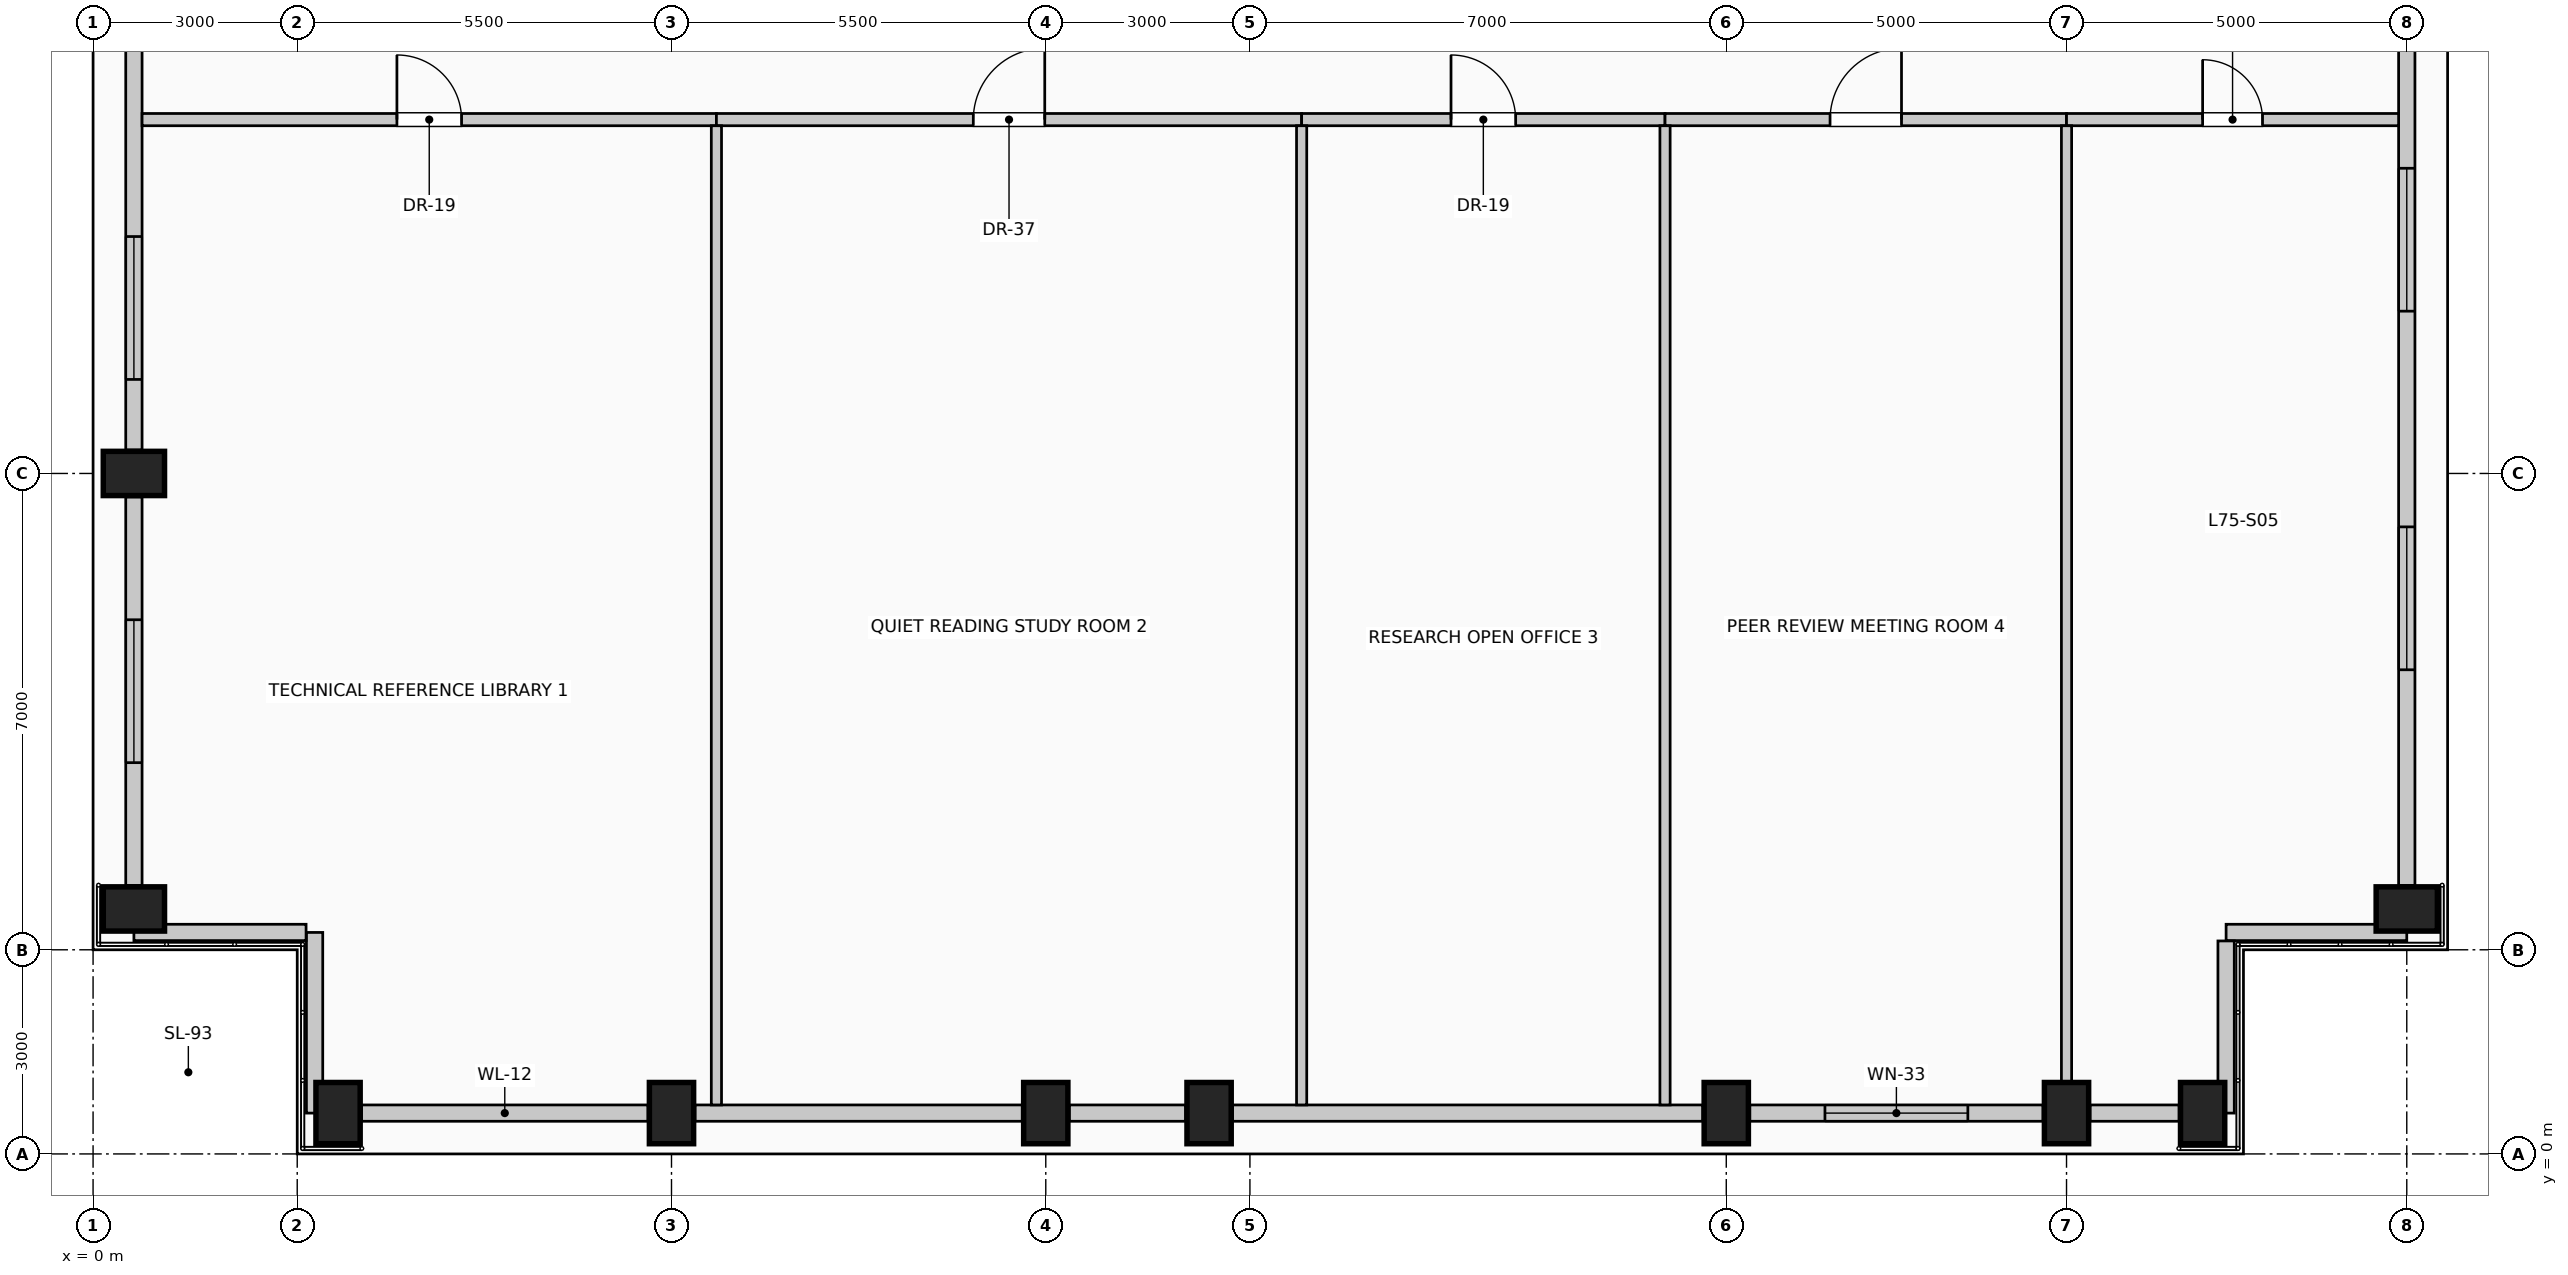
"""IFC4 building model, lengths in metres.
Left out: names, types, materials, properties, quantities, classifications, styles, units other than length and angle.
Written with IfcOpenShell. Run it as: python <this file> out.ifc"""

import sys

from ifc_helpers import new_model, si_unit, direction, frame, frame_2d, origin, origin_2d, place, context, subcontext, project, spatial, rectangle, extrude, element, fill, save


model = new_model("IFC4")
c1 = context("Model", 3, precision=1e-05, world=origin(), true_north=direction((0.0, 1.0)))
c2 = subcontext(c1, "Body", "Model", "MODEL_VIEW")
j1 = project(units=[si_unit("LENGTHUNIT", "METRE"), si_unit("PLANEANGLEUNIT", "RADIAN")], contexts=[c1])
p1 = place(None, origin())
s1 = spatial("IfcSite", under=j1, at=p1, CompositionType="ELEMENT")
p2 = place(p1, origin())
s2 = spatial("IfcBuilding", under=s1, at=p2, CompositionType="ELEMENT")
p3 = place(p2, frame((0.0, 0.0, 309.0)))
s3 = spatial("IfcBuildingStorey", under=s2, at=p3, CompositionType="ELEMENT", Elevation=309.0)
for number, where, z_axis, x_axis in (
    (1, (3.6, 0.6, 0.0), (0.0, 0.0, 1.0), (1.0, 0.0, 0.0)),
    (2, (8.5, 0.6, 0.0), (0.0, 0.0, 1.0), (1.0, 0.0, 0.0)),
    (3, (14.0, 0.6, 0.0), (0.0, 0.0, 1.0), (1.0, 0.0, 0.0)),
    (4, (16.4, 0.6, 0.0), (0.0, 0.0, 1.0), (1.0, 0.0, 0.0)),
    (5, (24.0, 0.6, 0.0), (0.0, 0.0, 1.0), (1.0, 0.0, 0.0)),
    (6, (29.0, 0.6, 0.0), (0.0, 0.0, 1.0), (1.0, 0.0, 0.0)),
    (7, (31.0, 0.6, 0.0), (0.0, 0.0, 1.0), (1.0, 0.0, 0.0)),
    (8, (0.6, 3.6, 0.0), (0.0, 0.0, 1.0), (0.0, 1.0, 0.0)),
    (9, (34.0, 3.6, 0.0), (0.0, 0.0, 1.0), (0.0, 1.0, 0.0)),
    (10, (0.6, 10.0, 0.0), (0.0, 0.0, 1.0), (0.0, 1.0, 0.0)),
):
    element("IfcColumn", number, at=place(p3, frame(where, z_axis=z_axis, x_axis=x_axis)), inside=s3, PredefinedType="COLUMN", context=c2, shape_type="SweptSolid", body=[
        extrude(rectangle(XDim=0.65, YDim=0.9, at=origin_2d()), origin(), (0.0, 0.0, 1.0), 4.0),
    ])
p4 = place(p3, frame((8.155, 0.6, 0.0), z_axis=(0.0, 0.0, 1.0), x_axis=(-1.0, 0.0, 0.0)))
e11 = element("IfcWall", 11, at=p4, inside=s3, PredefinedType="SOLIDWALL", context=c2, shape_type="SweptSolid", body=[
    extrude(rectangle(XDim=4.21, YDim=0.24, at=frame_2d((2.105, 0.0))), origin(), (0.0, 0.0, 1.0), 3.025),
])
p5 = place(p3, frame((13.655, 0.6, 0.0), z_axis=(0.0, 0.0, 1.0), x_axis=(-1.0, 0.0, 0.0)))
e12 = element("IfcWall", 12, at=p5, inside=s3, PredefinedType="SOLIDWALL", context=c2, shape_type="SweptSolid", body=[
    extrude(rectangle(XDim=4.81, YDim=0.24, at=frame_2d((2.405, 0.0))), origin(), (0.0, 0.0, 1.0), 3.025),
])
p6 = place(p3, frame((16.055, 0.6, 0.0), z_axis=(0.0, 0.0, 1.0), x_axis=(-1.0, 0.0, 0.0)))
e13 = element("IfcWall", 13, at=p6, inside=s3, PredefinedType="SOLIDWALL", context=c2, shape_type="SweptSolid", body=[
    extrude(rectangle(XDim=1.71, YDim=0.24, at=frame_2d((0.855, 0.0))), origin(), (0.0, 0.0, 1.0), 3.025),
])
p7 = place(p3, frame((23.655, 0.6, 0.0), z_axis=(0.0, 0.0, 1.0), x_axis=(-1.0, 0.0, 0.0)))
e14 = element("IfcWall", 14, at=p7, inside=s3, PredefinedType="SOLIDWALL", context=c2, shape_type="SweptSolid", body=[
    extrude(rectangle(XDim=6.91, YDim=0.24, at=frame_2d((3.455, 0.0))), origin(), (0.0, 0.0, 1.0), 3.025),
])
p8 = place(p3, frame((28.655, 0.6, 0.0), z_axis=(0.0, 0.0, 1.0), x_axis=(-1.0, 0.0, 0.0)))
e15 = element("IfcWall", 15, at=p8, inside=s3, PredefinedType="SOLIDWALL", context=c2, shape_type="SweptSolid", body=[
    extrude(rectangle(XDim=4.31, YDim=0.24, at=frame_2d((2.155, 0.0))), origin(), (0.0, 0.0, 1.0), 3.025),
])
p9 = place(p8, frame((1.105, 0.0, 0.35)))
e16 = element("IfcOpeningElement", 16, at=p9, cuts=e15, PredefinedType="OPENING", context=c2, shape_type="SweptSolid", body=[
    extrude(rectangle(XDim=2.1, YDim=2.2, at=frame_2d((1.05, 1.1))), frame((0.0, 0.13, 0.0), z_axis=(0.0, -1.0, 0.0), x_axis=(1.0, 0.0, 0.0)), (0.0, 0.0, 1.0), 0.26),
])
p10 = place(p3, frame((30.655, 0.6, 0.0), z_axis=(0.0, 0.0, 1.0), x_axis=(-1.0, 0.0, 0.0)))
e17 = element("IfcWall", 17, at=p10, inside=s3, PredefinedType="SOLIDWALL", context=c2, shape_type="SweptSolid", body=[
    extrude(rectangle(XDim=1.31, YDim=0.24, at=frame_2d((0.655, 0.0))), origin(), (0.0, 0.0, 1.0), 3.025),
])
p11 = place(p3, frame((0.6, 3.945, 0.0), z_axis=(0.0, 0.0, 1.0), x_axis=(0.0, 1.0, 0.0)))
e18 = element("IfcWall", 18, at=p11, inside=s3, PredefinedType="SOLIDWALL", context=c2, shape_type="SweptSolid", body=[
    extrude(rectangle(XDim=5.71, YDim=0.24, at=frame_2d((2.855, 0.0))), origin(), (0.0, 0.0, 1.0), 3.025),
])
p12 = place(p11, frame((1.805, 0.0, 0.35)))
e19 = element("IfcOpeningElement", 19, at=p12, cuts=e18, PredefinedType="OPENING", context=c2, shape_type="SweptSolid", body=[
    extrude(rectangle(XDim=2.1, YDim=2.2, at=frame_2d((1.05, 1.1))), frame((0.0, 0.13, 0.0), z_axis=(0.0, -1.0, 0.0), x_axis=(1.0, 0.0, 0.0)), (0.0, 0.0, 1.0), 0.26),
])
p13 = place(p3, frame((0.6, 10.345, 0.0), z_axis=(0.0, 0.0, 1.0), x_axis=(0.0, 1.0, 0.0)))
e20 = element("IfcWall", 20, at=p13, inside=s3, PredefinedType="SOLIDWALL", context=c2, shape_type="SweptSolid", body=[
    extrude(rectangle(XDim=7.31, YDim=0.24, at=frame_2d((3.655, 0.0))), origin(), (0.0, 0.0, 1.0), 3.025),
])
p14 = place(p13, frame((1.037, 0.0, 0.35)))
e21 = element("IfcOpeningElement", 21, at=p14, cuts=e20, PredefinedType="OPENING", context=c2, shape_type="SweptSolid", body=[
    extrude(rectangle(XDim=2.1, YDim=2.2, at=frame_2d((1.05, 1.1))), frame((0.0, 0.13, 0.0), z_axis=(0.0, -1.0, 0.0), x_axis=(1.0, 0.0, 0.0)), (0.0, 0.0, 1.0), 0.26),
])
p15 = place(p3, frame((34.0, 17.655, 0.0), z_axis=(0.0, 0.0, 1.0), x_axis=(0.0, -1.0, 0.0)))
e22 = element("IfcWall", 22, at=p15, inside=s3, PredefinedType="SOLIDWALL", context=c2, shape_type="SweptSolid", body=[
    extrude(rectangle(XDim=13.71, YDim=0.24, at=frame_2d((6.855, 0.0))), origin(), (0.0, 0.0, 1.0), 3.025),
])
p16 = place(p15, frame((3.17, 0.0, 0.35)))
e23 = element("IfcOpeningElement", 23, at=p16, cuts=e22, PredefinedType="OPENING", context=c2, shape_type="SweptSolid", body=[
    extrude(rectangle(XDim=2.1, YDim=2.2, at=frame_2d((1.05, 1.1))), frame((0.0, 0.13, 0.0), z_axis=(0.0, -1.0, 0.0), x_axis=(1.0, 0.0, 0.0)), (0.0, 0.0, 1.0), 0.26),
])
p17 = place(p15, frame((8.44, 0.0, 0.35)))
e24 = element("IfcOpeningElement", 24, at=p17, cuts=e22, PredefinedType="OPENING", context=c2, shape_type="SweptSolid", body=[
    extrude(rectangle(XDim=2.1, YDim=2.2, at=frame_2d((1.05, 1.1))), frame((0.0, 0.13, 0.0), z_axis=(0.0, -1.0, 0.0), x_axis=(1.0, 0.0, 0.0)), (0.0, 0.0, 1.0), 0.26),
])
p18 = place(p3, frame((34.0, 3.255, 0.0), z_axis=(0.0, 0.0, 1.0), x_axis=(-1.0, 0.0, 0.0)))
e25 = element("IfcWall", 25, at=p18, inside=s3, PredefinedType="SOLIDWALL", context=c2, shape_type="SweptSolid", body=[
    extrude(rectangle(XDim=2.655, YDim=0.24, at=frame_2d((1.328, 0.0))), origin(), (0.0, 0.0, 1.0), 3.775),
])
p19 = place(p3, frame((31.345, 3.13, 0.0), z_axis=(0.0, 0.0, 1.0), x_axis=(0.0, -1.0, 0.0)))
e26 = element("IfcWall", 26, at=p19, inside=s3, PredefinedType="SOLIDWALL", context=c2, shape_type="SweptSolid", body=[
    extrude(rectangle(XDim=2.53, YDim=0.24, at=frame_2d((1.265, 0.0))), origin(), (0.0, 0.0, 1.0), 3.775),
])
p20 = place(p3, frame((3.255, 0.6, 0.0), z_axis=(0.0, 0.0, 1.0), x_axis=(0.0, 1.0, 0.0)))
e27 = element("IfcWall", 27, at=p20, inside=s3, PredefinedType="SOLIDWALL", context=c2, shape_type="SweptSolid", body=[
    extrude(rectangle(XDim=2.655, YDim=0.24, at=frame_2d((1.327, 0.0))), origin(), (0.0, 0.0, 1.0), 3.775),
])
p21 = place(p3, frame((3.13, 3.255, 0.0), z_axis=(0.0, 0.0, 1.0), x_axis=(-1.0, 0.0, 0.0)))
e28 = element("IfcWall", 28, at=p21, inside=s3, PredefinedType="SOLIDWALL", context=c2, shape_type="SweptSolid", body=[
    extrude(rectangle(XDim=2.53, YDim=0.24, at=frame_2d((1.265, 0.0))), origin(), (0.0, 0.0, 1.0), 3.775),
])
p22 = place(p3, frame((0.72, 15.2, 0.0), z_axis=(0.0, 0.0, 1.0), x_axis=(1.0, 0.0, 0.0)))
e29 = element("IfcWall", 29, at=p22, inside=s3, PredefinedType="PARTITIONING", context=c2, shape_type="SweptSolid", body=[
    extrude(rectangle(XDim=8.44, YDim=0.18, at=frame_2d((4.22, 0.0))), origin(), (0.0, 0.0, 1.0), 3.775),
])
p23 = place(p22, frame((3.745, 0.0, 0.0)))
e30 = element("IfcOpeningElement", 30, at=p23, cuts=e29, PredefinedType="OPENING", context=c2, shape_type="SweptSolid", body=[
    extrude(rectangle(XDim=0.95, YDim=2.15, at=frame_2d((0.475, 1.075))), frame((0.0, 0.1, 0.0), z_axis=(0.0, -1.0, 0.0), x_axis=(1.0, 0.0, 0.0)), (0.0, 0.0, 1.0), 0.2),
])
p24 = place(p3, frame((9.16, 15.2, 0.0), z_axis=(0.0, 0.0, 1.0), x_axis=(1.0, 0.0, 0.0)))
e31 = element("IfcWall", 31, at=p24, inside=s3, PredefinedType="PARTITIONING", context=c2, shape_type="SweptSolid", body=[
    extrude(rectangle(XDim=8.6, YDim=0.18, at=frame_2d((4.3, 0.0))), origin(), (0.0, 0.0, 1.0), 3.775),
])
p25 = place(p24, frame((3.775, 0.0, 0.0)))
e32 = element("IfcOpeningElement", 32, at=p25, cuts=e31, PredefinedType="OPENING", context=c2, shape_type="SweptSolid", body=[
    extrude(rectangle(XDim=1.05, YDim=2.15, at=frame_2d((0.525, 1.075))), frame((0.0, 0.1, 0.0), z_axis=(0.0, -1.0, 0.0), x_axis=(1.0, 0.0, 0.0)), (0.0, 0.0, 1.0), 0.2),
])
p26 = place(p3, frame((17.76, 15.2, 0.0), z_axis=(0.0, 0.0, 1.0), x_axis=(1.0, 0.0, 0.0)))
e33 = element("IfcWall", 33, at=p26, inside=s3, PredefinedType="PARTITIONING", context=c2, shape_type="SweptSolid", body=[
    extrude(rectangle(XDim=5.34, YDim=0.18, at=frame_2d((2.67, 0.0))), origin(), (0.0, 0.0, 1.0), 3.775),
])
p27 = place(p26, frame((2.195, 0.0, 0.0)))
e34 = element("IfcOpeningElement", 34, at=p27, cuts=e33, PredefinedType="OPENING", context=c2, shape_type="SweptSolid", body=[
    extrude(rectangle(XDim=0.95, YDim=2.15, at=frame_2d((0.475, 1.075))), frame((0.0, 0.1, 0.0), z_axis=(0.0, -1.0, 0.0), x_axis=(1.0, 0.0, 0.0)), (0.0, 0.0, 1.0), 0.2),
])
p28 = place(p3, frame((23.1, 15.2, 0.0), z_axis=(0.0, 0.0, 1.0), x_axis=(1.0, 0.0, 0.0)))
e35 = element("IfcWall", 35, at=p28, inside=s3, PredefinedType="PARTITIONING", context=c2, shape_type="SweptSolid", body=[
    extrude(rectangle(XDim=5.9, YDim=0.18, at=frame_2d((2.95, 0.0))), origin(), (0.0, 0.0, 1.0), 3.775),
])
p29 = place(p28, frame((2.425, 0.0, 0.0)))
e36 = element("IfcOpeningElement", 36, at=p29, cuts=e35, PredefinedType="OPENING", context=c2, shape_type="SweptSolid", body=[
    extrude(rectangle(XDim=1.05, YDim=2.15, at=frame_2d((0.525, 1.075))), frame((0.0, 0.1, 0.0), z_axis=(0.0, -1.0, 0.0), x_axis=(1.0, 0.0, 0.0)), (0.0, 0.0, 1.0), 0.2),
])
p30 = place(p3, frame((29.0, 15.2, 0.0), z_axis=(0.0, 0.0, 1.0), x_axis=(1.0, 0.0, 0.0)))
e37 = element("IfcWall", 37, at=p30, inside=s3, PredefinedType="PARTITIONING", context=c2, shape_type="SweptSolid", body=[
    extrude(rectangle(XDim=4.88, YDim=0.18, at=frame_2d((2.44, 0.0))), origin(), (0.0, 0.0, 1.0), 3.775),
])
p31 = place(p30, frame((2.0, 0.0, 0.0)))
e38 = element("IfcOpeningElement", 38, at=p31, cuts=e37, PredefinedType="OPENING", context=c2, shape_type="SweptSolid", body=[
    extrude(rectangle(XDim=0.88, YDim=2.1, at=frame_2d((0.44, 1.05))), frame((0.0, 0.1, 0.0), z_axis=(0.0, -1.0, 0.0), x_axis=(1.0, 0.0, 0.0)), (0.0, 0.0, 1.0), 0.2),
])
for number, where, z_axis, x_axis in (
    (39, (9.16, 0.72, 0.0), (0.0, 0.0, 1.0), (0.0, 1.0, 0.0)),
    (40, (17.76, 0.72, 0.0), (0.0, 0.0, 1.0), (0.0, 1.0, 0.0)),
    (41, (23.1, 0.72, 0.0), (0.0, 0.0, 1.0), (0.0, 1.0, 0.0)),
):
    element("IfcWall", number, at=place(p3, frame(where, z_axis=z_axis, x_axis=x_axis)), inside=s3, PredefinedType="PARTITIONING", context=c2, shape_type="SweptSolid", body=[
        extrude(rectangle(XDim=14.39, YDim=0.15, at=frame_2d((7.195, 0.0))), origin(), (0.0, 0.0, 1.0), 3.775),
    ])
p32 = place(p3, frame((29.0, 1.05, 0.0), z_axis=(0.0, 0.0, 1.0), x_axis=(0.0, 1.0, 0.0)))
e42 = element("IfcWall", 42, at=p32, inside=s3, PredefinedType="PARTITIONING", context=c2, shape_type="SweptSolid", body=[
    extrude(rectangle(XDim=14.06, YDim=0.15, at=frame_2d((7.03, 0.0))), origin(), (0.0, 0.0, 1.0), 3.27),
])
p33 = place(p9, origin())
e43 = element("IfcWindow", 43, at=p33, inside=s3, PartitioningType="SINGLE_PANEL", PredefinedType="WINDOW", context=c2, shape_type="SweptSolid", body=[
    extrude(rectangle(XDim=2.1, YDim=2.2, at=frame_2d((1.05, 1.1))), frame((0.0, 0.03, 0.0), z_axis=(0.0, -1.0, 0.0), x_axis=(1.0, 0.0, 0.0)), (0.0, 0.0, 1.0), 0.06),
])
fill(e16, e43)
p34 = place(p12, origin())
e44 = element("IfcWindow", 44, at=p34, inside=s3, PartitioningType="SINGLE_PANEL", PredefinedType="WINDOW", context=c2, shape_type="SweptSolid", body=[
    extrude(rectangle(XDim=2.1, YDim=2.2, at=frame_2d((1.05, 1.1))), frame((0.0, 0.03, 0.0), z_axis=(0.0, -1.0, 0.0), x_axis=(1.0, 0.0, 0.0)), (0.0, 0.0, 1.0), 0.06),
])
fill(e19, e44)
p35 = place(p14, origin())
e45 = element("IfcWindow", 45, at=p35, inside=s3, PartitioningType="SINGLE_PANEL", PredefinedType="WINDOW", context=c2, shape_type="SweptSolid", body=[
    extrude(rectangle(XDim=2.1, YDim=2.2, at=frame_2d((1.05, 1.1))), frame((0.0, 0.03, 0.0), z_axis=(0.0, -1.0, 0.0), x_axis=(1.0, 0.0, 0.0)), (0.0, 0.0, 1.0), 0.06),
])
fill(e21, e45)
p36 = place(p16, origin())
e46 = element("IfcWindow", 46, at=p36, inside=s3, PartitioningType="SINGLE_PANEL", PredefinedType="WINDOW", context=c2, shape_type="SweptSolid", body=[
    extrude(rectangle(XDim=2.1, YDim=2.2, at=frame_2d((1.05, 1.1))), frame((0.0, 0.03, 0.0), z_axis=(0.0, -1.0, 0.0), x_axis=(1.0, 0.0, 0.0)), (0.0, 0.0, 1.0), 0.06),
])
fill(e23, e46)
p37 = place(p17, origin())
e47 = element("IfcWindow", 47, at=p37, inside=s3, PartitioningType="SINGLE_PANEL", PredefinedType="WINDOW", context=c2, shape_type="SweptSolid", body=[
    extrude(rectangle(XDim=2.1, YDim=2.2, at=frame_2d((1.05, 1.1))), frame((0.0, 0.03, 0.0), z_axis=(0.0, -1.0, 0.0), x_axis=(1.0, 0.0, 0.0)), (0.0, 0.0, 1.0), 0.06),
])
fill(e24, e47)
p38 = place(p23, origin())
e48 = element("IfcDoor", 48, at=p38, inside=s3, OperationType="SINGLE_SWING_LEFT", PredefinedType="DOOR", context=c2, shape_type="SweptSolid", body=[
    extrude(rectangle(XDim=0.95, YDim=2.15, at=frame_2d((0.475, 1.075))), frame((0.0, 0.025, 0.0), z_axis=(0.0, -1.0, 0.0), x_axis=(1.0, 0.0, 0.0)), (0.0, 0.0, 1.0), 0.05),
])
fill(e30, e48)
p39 = place(p25, origin())
e49 = element("IfcDoor", 49, at=p39, inside=s3, OperationType="SINGLE_SWING_RIGHT", PredefinedType="DOOR", context=c2, shape_type="SweptSolid", body=[
    extrude(rectangle(XDim=1.05, YDim=2.15, at=frame_2d((0.525, 1.075))), frame((0.0, 0.025, 0.0), z_axis=(0.0, -1.0, 0.0), x_axis=(1.0, 0.0, 0.0)), (0.0, 0.0, 1.0), 0.05),
])
fill(e32, e49)
p40 = place(p27, origin())
e50 = element("IfcDoor", 50, at=p40, inside=s3, OperationType="SINGLE_SWING_LEFT", PredefinedType="DOOR", context=c2, shape_type="SweptSolid", body=[
    extrude(rectangle(XDim=0.95, YDim=2.15, at=frame_2d((0.475, 1.075))), frame((0.0, 0.025, 0.0), z_axis=(0.0, -1.0, 0.0), x_axis=(1.0, 0.0, 0.0)), (0.0, 0.0, 1.0), 0.05),
])
fill(e34, e50)
p41 = place(p29, origin())
e51 = element("IfcDoor", 51, at=p41, inside=s3, OperationType="SINGLE_SWING_RIGHT", PredefinedType="DOOR", context=c2, shape_type="SweptSolid", body=[
    extrude(rectangle(XDim=1.05, YDim=2.15, at=frame_2d((0.525, 1.075))), frame((0.0, 0.025, 0.0), z_axis=(0.0, -1.0, 0.0), x_axis=(1.0, 0.0, 0.0)), (0.0, 0.0, 1.0), 0.05),
])
fill(e36, e51)
p42 = place(p31, origin())
e52 = element("IfcDoor", 52, at=p42, inside=s3, OperationType="SINGLE_SWING_LEFT", PredefinedType="DOOR", context=c2, shape_type="SweptSolid", body=[
    extrude(rectangle(XDim=0.88, YDim=2.1, at=frame_2d((0.44, 1.05))), frame((0.0, 0.025, 0.0), z_axis=(0.0, -1.0, 0.0), x_axis=(1.0, 0.0, 0.0)), (0.0, 0.0, 1.0), 0.05),
])
fill(e38, e52)
save(model, sys.argv[1])
